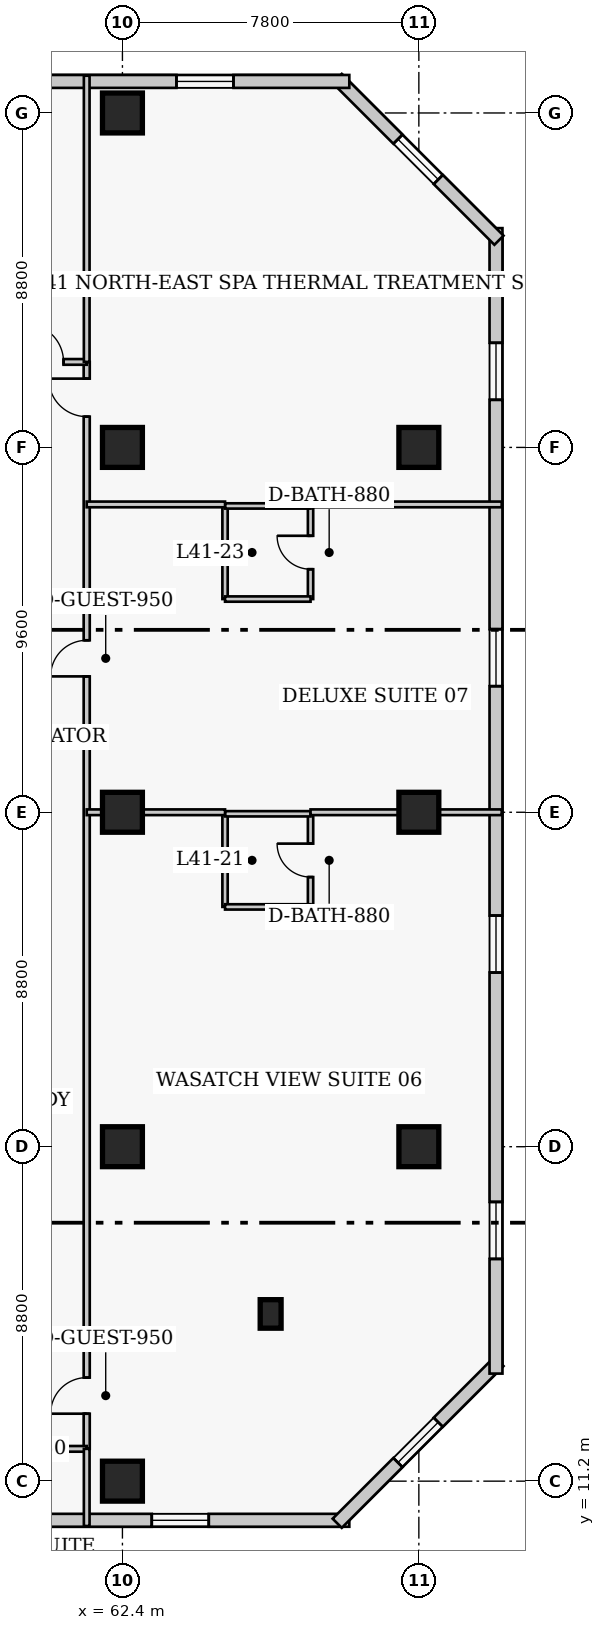
"""IFC4 building model, lengths in metres.
Left out: names, types, materials, properties, quantities, classifications, styles, units other than length and angle.
Written with IfcOpenShell. Run it as: python <this file> out.ifc"""

import sys

from ifc_helpers import new_model, si_unit, direction, frame, frame_2d, origin, origin_2d, place, context, subcontext, project, spatial, rectangle, extrude, element, fill, save


model = new_model("IFC4")
c1 = context("Model", 3, precision=1e-05, world=origin(), true_north=direction((0.0, 1.0)))
c2 = subcontext(c1, "Body", "Model", "MODEL_VIEW")
j1 = project(units=[si_unit("LENGTHUNIT", "METRE"), si_unit("PLANEANGLEUNIT", "RADIAN")], contexts=[c1])
p1 = place(None, origin())
s1 = spatial("IfcSite", under=j1, at=p1, CompositionType="ELEMENT")
p2 = place(p1, origin())
s2 = spatial("IfcBuilding", under=s1, at=p2, CompositionType="ELEMENT")
p3 = place(p2, frame((0.0, 0.0, 165.0)))
s3 = spatial("IfcBuildingStorey", under=s2, at=p3, CompositionType="ELEMENT", Elevation=165.0)
for number, where, z_axis, x_axis in (
    (1, (62.4, 11.2, 0.0), (0.0, 0.0, 1.0), (1.0, 0.0, 0.0)),
    (2, (62.4, 20.0, 0.0), (0.0, 0.0, 1.0), (1.0, 0.0, 0.0)),
    (3, (62.4, 28.8, 0.0), (0.0, 0.0, 1.0), (1.0, 0.0, 0.0)),
    (4, (62.4, 38.4, 0.0), (0.0, 0.0, 1.0), (1.0, 0.0, 0.0)),
    (5, (62.4, 47.2, 0.0), (0.0, 0.0, 1.0), (1.0, 0.0, 0.0)),
    (6, (70.2, 20.0, 0.0), (0.0, 0.0, 1.0), (1.0, 0.0, 0.0)),
    (7, (70.2, 28.8, 0.0), (0.0, 0.0, 1.0), (1.0, 0.0, 0.0)),
    (8, (70.2, 38.4, 0.0), (0.0, 0.0, 1.0), (1.0, 0.0, 0.0)),
):
    element("IfcColumn", number, at=place(p3, frame(where, z_axis=z_axis, x_axis=x_axis)), inside=s3, PredefinedType="COLUMN", context=c2, shape_type="SweptSolid", body=[
        extrude(rectangle(XDim=1.05, YDim=1.05, at=origin_2d()), origin(), (0.0, 0.0, 1.0), 3.8),
    ])
p4 = place(p3, frame((66.3, 15.6, 0.0), z_axis=(0.0, 0.0, 1.0), x_axis=(1.0, 0.0, 0.0)))
e9 = element("IfcColumn", 9, at=p4, inside=s3, PredefinedType="PILASTER", context=c2, shape_type="SweptSolid", body=[
    extrude(rectangle(XDim=0.55, YDim=0.75, at=origin_2d()), origin(), (0.0, 0.0, 1.0), 3.8),
])
p5 = place(p3, frame((41.68, 10.17, 0.0), z_axis=(0.0, 0.0, 1.0), x_axis=(1.0, 0.0, 0.0)))
e10 = element("IfcWall", 10, at=p5, inside=s3, PredefinedType="SOLIDWALL", context=c2, shape_type="SweptSolid", body=[
    extrude(rectangle(XDim=26.69, YDim=0.34, at=frame_2d((13.345, 0.0))), origin(), (0.0, 0.0, 1.0), 3.55),
])
p6 = place(p5, frame((2.548, 0.0, 0.85)))
e11 = element("IfcOpeningElement", 11, at=p6, cuts=e10, PredefinedType="OPENING", context=c2, shape_type="SweptSolid", body=[
    extrude(rectangle(XDim=1.5, YDim=1.75, at=frame_2d((0.75, 0.875))), frame((0.0, 0.18, 0.0), z_axis=(0.0, -1.0, 0.0), x_axis=(1.0, 0.0, 0.0)), (0.0, 0.0, 1.0), 0.36),
])
p7 = place(p5, frame((13.745, 0.0, 0.85)))
e12 = element("IfcOpeningElement", 12, at=p7, cuts=e10, PredefinedType="OPENING", context=c2, shape_type="SweptSolid", body=[
    extrude(rectangle(XDim=1.5, YDim=1.75, at=frame_2d((0.75, 0.875))), frame((0.0, 0.18, 0.0), z_axis=(0.0, -1.0, 0.0), x_axis=(1.0, 0.0, 0.0)), (0.0, 0.0, 1.0), 0.36),
])
p8 = place(p5, frame((21.492, 0.0, 0.85)))
e13 = element("IfcOpeningElement", 13, at=p8, cuts=e10, PredefinedType="OPENING", context=c2, shape_type="SweptSolid", body=[
    extrude(rectangle(XDim=1.5, YDim=1.75, at=frame_2d((0.75, 0.875))), frame((0.0, 0.18, 0.0), z_axis=(0.0, -1.0, 0.0), x_axis=(1.0, 0.0, 0.0)), (0.0, 0.0, 1.0), 0.36),
])
p9 = place(p3, frame((68.052, 10.092, 0.0), z_axis=(0.0, 0.0, 1.0), x_axis=(0.707106781187, 0.707106781187, 0.0)))
e14 = element("IfcWall", 14, at=p9, inside=s3, PredefinedType="SOLIDWALL", context=c2, shape_type="SweptSolid", body=[
    extrude(rectangle(XDim=6.02, YDim=0.34, at=frame_2d((3.01, 0.0))), origin(), (0.0, 0.0, 1.0), 3.55),
])
p10 = place(p9, frame((2.26, 0.0, 0.85)))
e15 = element("IfcOpeningElement", 15, at=p10, cuts=e14, PredefinedType="OPENING", context=c2, shape_type="SweptSolid", body=[
    extrude(rectangle(XDim=1.5, YDim=1.75, at=frame_2d((0.75, 0.875))), frame((0.0, 0.18, 0.0), z_axis=(0.0, -1.0, 0.0), x_axis=(1.0, 0.0, 0.0)), (0.0, 0.0, 1.0), 0.36),
])
p11 = place(p3, frame((72.23, 14.03, 0.0), z_axis=(0.0, 0.0, 1.0), x_axis=(0.0, 1.0, 0.0)))
e16 = element("IfcWall", 16, at=p11, inside=s3, PredefinedType="SOLIDWALL", context=c2, shape_type="SweptSolid", body=[
    extrude(rectangle(XDim=30.14, YDim=0.34, at=frame_2d((15.07, 0.0))), origin(), (0.0, 0.0, 1.0), 3.55),
])
p12 = place(p11, frame((3.018, 0.0, 0.85)))
e17 = element("IfcOpeningElement", 17, at=p12, cuts=e16, PredefinedType="OPENING", context=c2, shape_type="SweptSolid", body=[
    extrude(rectangle(XDim=1.5, YDim=1.75, at=frame_2d((0.75, 0.875))), frame((0.0, 0.18, 0.0), z_axis=(0.0, -1.0, 0.0), x_axis=(1.0, 0.0, 0.0)), (0.0, 0.0, 1.0), 0.36),
])
p13 = place(p11, frame((10.552, 0.0, 0.85)))
e18 = element("IfcOpeningElement", 18, at=p13, cuts=e16, PredefinedType="OPENING", context=c2, shape_type="SweptSolid", body=[
    extrude(rectangle(XDim=1.5, YDim=1.75, at=frame_2d((0.75, 0.875))), frame((0.0, 0.18, 0.0), z_axis=(0.0, -1.0, 0.0), x_axis=(1.0, 0.0, 0.0)), (0.0, 0.0, 1.0), 0.36),
])
p14 = place(p11, frame((18.087, 0.0, 0.85)))
e19 = element("IfcOpeningElement", 19, at=p14, cuts=e16, PredefinedType="OPENING", context=c2, shape_type="SweptSolid", body=[
    extrude(rectangle(XDim=1.5, YDim=1.75, at=frame_2d((0.75, 0.875))), frame((0.0, 0.18, 0.0), z_axis=(0.0, -1.0, 0.0), x_axis=(1.0, 0.0, 0.0)), (0.0, 0.0, 1.0), 0.36),
])
p15 = place(p11, frame((25.623, 0.0, 0.85)))
e20 = element("IfcOpeningElement", 20, at=p15, cuts=e16, PredefinedType="OPENING", context=c2, shape_type="SweptSolid", body=[
    extrude(rectangle(XDim=1.5, YDim=1.75, at=frame_2d((0.75, 0.875))), frame((0.0, 0.18, 0.0), z_axis=(0.0, -1.0, 0.0), x_axis=(1.0, 0.0, 0.0)), (0.0, 0.0, 1.0), 0.36),
])
p16 = place(p3, frame((72.308, 43.852, 0.0), z_axis=(0.0, 0.0, 1.0), x_axis=(-0.707106781187, 0.707106781187, 0.0)))
e21 = element("IfcWall", 21, at=p16, inside=s3, PredefinedType="SOLIDWALL", context=c2, shape_type="SweptSolid", body=[
    extrude(rectangle(XDim=6.02, YDim=0.34, at=frame_2d((3.01, 0.0))), origin(), (0.0, 0.0, 1.0), 3.55),
])
p17 = place(p16, frame((2.26, 0.0, 0.85)))
e22 = element("IfcOpeningElement", 22, at=p17, cuts=e21, PredefinedType="OPENING", context=c2, shape_type="SweptSolid", body=[
    extrude(rectangle(XDim=1.5, YDim=1.75, at=frame_2d((0.75, 0.875))), frame((0.0, 0.18, 0.0), z_axis=(0.0, -1.0, 0.0), x_axis=(1.0, 0.0, 0.0)), (0.0, 0.0, 1.0), 0.36),
])
p18 = place(p3, frame((68.37, 48.03, 0.0), z_axis=(0.0, 0.0, 1.0), x_axis=(-1.0, 0.0, 0.0)))
e23 = element("IfcWall", 23, at=p18, inside=s3, PredefinedType="SOLIDWALL", context=c2, shape_type="SweptSolid", body=[
    extrude(rectangle(XDim=26.69, YDim=0.34, at=frame_2d((13.345, 0.0))), origin(), (0.0, 0.0, 1.0), 3.55),
])
p19 = place(p18, frame((3.048, 0.0, 0.85)))
e24 = element("IfcOpeningElement", 24, at=p19, cuts=e23, PredefinedType="OPENING", context=c2, shape_type="SweptSolid", body=[
    extrude(rectangle(XDim=1.5, YDim=1.75, at=frame_2d((0.75, 0.875))), frame((0.0, 0.18, 0.0), z_axis=(0.0, -1.0, 0.0), x_axis=(1.0, 0.0, 0.0)), (0.0, 0.0, 1.0), 0.36),
])
p20 = place(p18, frame((11.445, 0.0, 0.85)))
e25 = element("IfcOpeningElement", 25, at=p20, cuts=e23, PredefinedType="OPENING", context=c2, shape_type="SweptSolid", body=[
    extrude(rectangle(XDim=1.5, YDim=1.75, at=frame_2d((0.75, 0.875))), frame((0.0, 0.18, 0.0), z_axis=(0.0, -1.0, 0.0), x_axis=(1.0, 0.0, 0.0)), (0.0, 0.0, 1.0), 0.36),
])
p21 = place(p18, frame((22.642, 0.0, 0.85)))
e26 = element("IfcOpeningElement", 26, at=p21, cuts=e23, PredefinedType="OPENING", context=c2, shape_type="SweptSolid", body=[
    extrude(rectangle(XDim=1.5, YDim=1.75, at=frame_2d((0.75, 0.875))), frame((0.0, 0.18, 0.0), z_axis=(0.0, -1.0, 0.0), x_axis=(1.0, 0.0, 0.0)), (0.0, 0.0, 1.0), 0.36),
])
p22 = place(p3, frame((61.46, 12.05, 0.0), z_axis=(0.0, 0.0, 1.0), x_axis=(0.0, 1.0, 0.0)))
e27 = element("IfcWall", 27, at=p22, inside=s3, PredefinedType="PARTITIONING", context=c2, shape_type="SweptSolid", body=[
    extrude(rectangle(XDim=28.6, YDim=0.16, at=frame_2d((14.3, 0.0))), origin(), (0.0, 0.0, 1.0), 3.55),
])
p23 = place(p22, frame((0.925, 0.0, 0.0)))
e28 = element("IfcOpeningElement", 28, at=p23, cuts=e27, PredefinedType="OPENING", context=c2, shape_type="SweptSolid", body=[
    extrude(rectangle(XDim=0.95, YDim=2.1, at=frame_2d((0.475, 1.05))), frame((0.0, 0.09, 0.0), z_axis=(0.0, -1.0, 0.0), x_axis=(1.0, 0.0, 0.0)), (0.0, 0.0, 1.0), 0.18),
])
p24 = place(p22, frame((20.325, 0.0, 0.0)))
e29 = element("IfcOpeningElement", 29, at=p24, cuts=e27, PredefinedType="OPENING", context=c2, shape_type="SweptSolid", body=[
    extrude(rectangle(XDim=0.95, YDim=2.1, at=frame_2d((0.475, 1.05))), frame((0.0, 0.09, 0.0), z_axis=(0.0, -1.0, 0.0), x_axis=(1.0, 0.0, 0.0)), (0.0, 0.0, 1.0), 0.18),
])
p25 = place(p22, frame((27.16, 0.0, 0.0)))
e30 = element("IfcOpeningElement", 30, at=p25, cuts=e27, PredefinedType="OPENING", context=c2, shape_type="SweptSolid", body=[
    extrude(rectangle(XDim=1.0, YDim=2.15, at=frame_2d((0.5, 1.075))), frame((0.0, 0.09, 0.0), z_axis=(0.0, -1.0, 0.0), x_axis=(1.0, 0.0, 0.0)), (0.0, 0.0, 1.0), 0.18),
])
p26 = place(p3, frame((59.24, 12.05, 0.0), z_axis=(0.0, 0.0, 1.0), x_axis=(1.0, 0.0, 0.0)))
e31 = element("IfcWall", 31, at=p26, inside=s3, PredefinedType="PARTITIONING", context=c2, shape_type="SweptSolid", body=[
    extrude(rectangle(XDim=2.22, YDim=0.15, at=frame_2d((1.11, 0.0))), origin(), (0.0, 0.0, 1.0), 3.55),
])
p27 = place(p3, frame((56.8, 40.65, 0.0), z_axis=(0.0, 0.0, 1.0), x_axis=(1.0, 0.0, 0.0)))
e32 = element("IfcWall", 32, at=p27, inside=s3, PredefinedType="PARTITIONING", context=c2, shape_type="SweptSolid", body=[
    extrude(rectangle(XDim=4.66, YDim=0.15, at=frame_2d((2.33, 0.0))), origin(), (0.0, 0.0, 1.0), 3.55),
])
p28 = place(p27, frame((3.05, 0.0, 0.0)))
e33 = element("IfcOpeningElement", 33, at=p28, cuts=e32, PredefinedType="OPENING", context=c2, shape_type="SweptSolid", body=[
    extrude(rectangle(XDim=1.0, YDim=2.15, at=frame_2d((0.5, 1.075))), frame((0.0, 0.085, 0.0), z_axis=(0.0, -1.0, 0.0), x_axis=(1.0, 0.0, 0.0)), (0.0, 0.0, 1.0), 0.17),
])
p29 = place(p3, frame((61.46, 40.65, 0.0), z_axis=(0.0, 0.0, 1.0), x_axis=(0.0, 1.0, 0.0)))
e34 = element("IfcWall", 34, at=p29, inside=s3, PredefinedType="PARTITIONING", context=c2, shape_type="SweptSolid", body=[
    extrude(rectangle(XDim=7.53, YDim=0.15, at=frame_2d((3.765, 0.0))), origin(), (0.0, 0.0, 1.0), 3.55),
])
p30 = place(p3, frame((61.46, 10.02, 0.0), z_axis=(0.0, 0.0, 1.0), x_axis=(0.0, 1.0, 0.0)))
e35 = element("IfcWall", 35, at=p30, inside=s3, PredefinedType="PARTITIONING", context=c2, shape_type="SweptSolid", body=[
    extrude(rectangle(XDim=2.03, YDim=0.15, at=frame_2d((1.015, 0.0))), origin(), (0.0, 0.0, 1.0), 3.55),
])
p31 = place(p3, frame((65.1, 26.31, 0.0), z_axis=(0.0, 0.0, 1.0), x_axis=(0.0, 1.0, 0.0)))
e36 = element("IfcWall", 36, at=p31, inside=s3, PredefinedType="PLUMBINGWALL", context=c2, shape_type="SweptSolid", body=[
    extrude(rectangle(XDim=2.45, YDim=0.14, at=frame_2d((1.225, 0.0))), origin(), (0.0, 0.0, 1.0), 3.55),
])
p32 = place(p3, frame((67.35, 26.31, 0.0), z_axis=(0.0, 0.0, 1.0), x_axis=(0.0, 1.0, 0.0)))
e37 = element("IfcWall", 37, at=p32, inside=s3, PredefinedType="PLUMBINGWALL", context=c2, shape_type="SweptSolid", body=[
    extrude(rectangle(XDim=2.45, YDim=0.14, at=frame_2d((1.225, 0.0))), origin(), (0.0, 0.0, 1.0), 3.55),
])
p33 = place(p32, frame((0.785, 0.0, 0.0)))
e38 = element("IfcOpeningElement", 38, at=p33, cuts=e37, PredefinedType="OPENING", context=c2, shape_type="SweptSolid", body=[
    extrude(rectangle(XDim=0.88, YDim=2.05, at=frame_2d((0.44, 1.025))), frame((0.0, 0.08, 0.0), z_axis=(0.0, -1.0, 0.0), x_axis=(1.0, 0.0, 0.0)), (0.0, 0.0, 1.0), 0.16),
])
p34 = place(p3, frame((65.1, 26.31, 0.0), z_axis=(0.0, 0.0, 1.0), x_axis=(1.0, 0.0, 0.0)))
e39 = element("IfcWall", 39, at=p34, inside=s3, PredefinedType="PLUMBINGWALL", context=c2, shape_type="SweptSolid", body=[
    extrude(rectangle(XDim=2.25, YDim=0.14, at=frame_2d((1.125, 0.0))), origin(), (0.0, 0.0, 1.0), 3.55),
])
p35 = place(p3, frame((65.1, 28.76, 0.0), z_axis=(0.0, 0.0, 1.0), x_axis=(1.0, 0.0, 0.0)))
e40 = element("IfcWall", 40, at=p35, inside=s3, PredefinedType="PLUMBINGWALL", context=c2, shape_type="SweptSolid", body=[
    extrude(rectangle(XDim=2.25, YDim=0.14, at=frame_2d((1.125, 0.0))), origin(), (0.0, 0.0, 1.0), 2.9),
])
p36 = place(p3, frame((61.46, 28.8, 0.0), z_axis=(0.0, 0.0, 1.0), x_axis=(1.0, 0.0, 0.0)))
e41 = element("IfcWall", 41, at=p36, inside=s3, PredefinedType="PARTITIONING", context=c2, shape_type="SweptSolid", body=[
    extrude(rectangle(XDim=3.64, YDim=0.15, at=frame_2d((1.82, 0.0))), origin(), (0.0, 0.0, 1.0), 2.778),
])
p37 = place(p3, frame((67.35, 28.8, 0.0), z_axis=(0.0, 0.0, 1.0), x_axis=(1.0, 0.0, 0.0)))
e42 = element("IfcWall", 42, at=p37, inside=s3, PredefinedType="PARTITIONING", context=c2, shape_type="SweptSolid", body=[
    extrude(rectangle(XDim=5.03, YDim=0.15, at=frame_2d((2.515, 0.0))), origin(), (0.0, 0.0, 1.0), 2.778),
])
p38 = place(p3, frame((65.1, 34.41, 0.0), z_axis=(0.0, 0.0, 1.0), x_axis=(0.0, 1.0, 0.0)))
e43 = element("IfcWall", 43, at=p38, inside=s3, PredefinedType="PLUMBINGWALL", context=c2, shape_type="SweptSolid", body=[
    extrude(rectangle(XDim=2.45, YDim=0.14, at=frame_2d((1.225, 0.0))), origin(), (0.0, 0.0, 1.0), 3.55),
])
p39 = place(p3, frame((67.35, 34.41, 0.0), z_axis=(0.0, 0.0, 1.0), x_axis=(0.0, 1.0, 0.0)))
e44 = element("IfcWall", 44, at=p39, inside=s3, PredefinedType="PLUMBINGWALL", context=c2, shape_type="SweptSolid", body=[
    extrude(rectangle(XDim=2.45, YDim=0.14, at=frame_2d((1.225, 0.0))), origin(), (0.0, 0.0, 1.0), 3.55),
])
p40 = place(p39, frame((0.785, 0.0, 0.0)))
e45 = element("IfcOpeningElement", 45, at=p40, cuts=e44, PredefinedType="OPENING", context=c2, shape_type="SweptSolid", body=[
    extrude(rectangle(XDim=0.88, YDim=2.05, at=frame_2d((0.44, 1.025))), frame((0.0, 0.08, 0.0), z_axis=(0.0, -1.0, 0.0), x_axis=(1.0, 0.0, 0.0)), (0.0, 0.0, 1.0), 0.16),
])
for number, where, z_axis, x_axis in (
    (46, (65.1, 34.41, 0.0), (0.0, 0.0, 1.0), (1.0, 0.0, 0.0)),
    (47, (65.1, 36.86, 0.0), (0.0, 0.0, 1.0), (1.0, 0.0, 0.0)),
):
    element("IfcWall", number, at=place(p3, frame(where, z_axis=z_axis, x_axis=x_axis)), inside=s3, PredefinedType="PLUMBINGWALL", context=c2, shape_type="SweptSolid", body=[
        extrude(rectangle(XDim=2.25, YDim=0.14, at=frame_2d((1.125, 0.0))), origin(), (0.0, 0.0, 1.0), 3.55),
    ])
p41 = place(p3, frame((61.46, 36.9, 0.0), z_axis=(0.0, 0.0, 1.0), x_axis=(1.0, 0.0, 0.0)))
e48 = element("IfcWall", 48, at=p41, inside=s3, PredefinedType="PARTITIONING", context=c2, shape_type="SweptSolid", body=[
    extrude(rectangle(XDim=3.64, YDim=0.15, at=frame_2d((1.82, 0.0))), origin(), (0.0, 0.0, 1.0), 3.55),
])
p42 = place(p3, frame((67.35, 36.9, 0.0), z_axis=(0.0, 0.0, 1.0), x_axis=(1.0, 0.0, 0.0)))
e49 = element("IfcWall", 49, at=p42, inside=s3, PredefinedType="PARTITIONING", context=c2, shape_type="SweptSolid", body=[
    extrude(rectangle(XDim=5.03, YDim=0.15, at=frame_2d((2.515, 0.0))), origin(), (0.0, 0.0, 1.0), 3.55),
])
p43 = place(p8, origin())
e50 = element("IfcWindow", 50, at=p43, inside=s3, PartitioningType="SINGLE_PANEL", PredefinedType="WINDOW", context=c2, shape_type="SweptSolid", body=[
    extrude(rectangle(XDim=1.5, YDim=1.75, at=frame_2d((0.75, 0.875))), frame((0.0, 0.03, 0.0), z_axis=(0.0, -1.0, 0.0), x_axis=(1.0, 0.0, 0.0)), (0.0, 0.0, 1.0), 0.06),
])
fill(e13, e50)
p44 = place(p10, origin())
e51 = element("IfcWindow", 51, at=p44, inside=s3, PartitioningType="SINGLE_PANEL", PredefinedType="WINDOW", context=c2, shape_type="SweptSolid", body=[
    extrude(rectangle(XDim=1.5, YDim=1.75, at=frame_2d((0.75, 0.875))), frame((0.0, 0.03, 0.0), z_axis=(0.0, -1.0, 0.0), x_axis=(1.0, 0.0, 0.0)), (0.0, 0.0, 1.0), 0.06),
])
fill(e15, e51)
p45 = place(p12, origin())
e52 = element("IfcWindow", 52, at=p45, inside=s3, PartitioningType="SINGLE_PANEL", PredefinedType="WINDOW", context=c2, shape_type="SweptSolid", body=[
    extrude(rectangle(XDim=1.5, YDim=1.75, at=frame_2d((0.75, 0.875))), frame((0.0, 0.03, 0.0), z_axis=(0.0, -1.0, 0.0), x_axis=(1.0, 0.0, 0.0)), (0.0, 0.0, 1.0), 0.06),
])
fill(e17, e52)
p46 = place(p13, origin())
e53 = element("IfcWindow", 53, at=p46, inside=s3, PartitioningType="SINGLE_PANEL", PredefinedType="WINDOW", context=c2, shape_type="SweptSolid", body=[
    extrude(rectangle(XDim=1.5, YDim=1.75, at=frame_2d((0.75, 0.875))), frame((0.0, 0.03, 0.0), z_axis=(0.0, -1.0, 0.0), x_axis=(1.0, 0.0, 0.0)), (0.0, 0.0, 1.0), 0.06),
])
fill(e18, e53)
p47 = place(p14, origin())
e54 = element("IfcWindow", 54, at=p47, inside=s3, PartitioningType="SINGLE_PANEL", PredefinedType="WINDOW", context=c2, shape_type="SweptSolid", body=[
    extrude(rectangle(XDim=1.5, YDim=1.75, at=frame_2d((0.75, 0.875))), frame((0.0, 0.03, 0.0), z_axis=(0.0, -1.0, 0.0), x_axis=(1.0, 0.0, 0.0)), (0.0, 0.0, 1.0), 0.06),
])
fill(e19, e54)
p48 = place(p15, origin())
e55 = element("IfcWindow", 55, at=p48, inside=s3, PartitioningType="SINGLE_PANEL", PredefinedType="WINDOW", context=c2, shape_type="SweptSolid", body=[
    extrude(rectangle(XDim=1.5, YDim=1.75, at=frame_2d((0.75, 0.875))), frame((0.0, 0.03, 0.0), z_axis=(0.0, -1.0, 0.0), x_axis=(1.0, 0.0, 0.0)), (0.0, 0.0, 1.0), 0.06),
])
fill(e20, e55)
p49 = place(p17, origin())
e56 = element("IfcWindow", 56, at=p49, inside=s3, PartitioningType="SINGLE_PANEL", PredefinedType="WINDOW", context=c2, shape_type="SweptSolid", body=[
    extrude(rectangle(XDim=1.5, YDim=1.75, at=frame_2d((0.75, 0.875))), frame((0.0, 0.03, 0.0), z_axis=(0.0, -1.0, 0.0), x_axis=(1.0, 0.0, 0.0)), (0.0, 0.0, 1.0), 0.06),
])
fill(e22, e56)
p50 = place(p19, origin())
e57 = element("IfcWindow", 57, at=p50, inside=s3, PartitioningType="SINGLE_PANEL", PredefinedType="WINDOW", context=c2, shape_type="SweptSolid", body=[
    extrude(rectangle(XDim=1.5, YDim=1.75, at=frame_2d((0.75, 0.875))), frame((0.0, 0.03, 0.0), z_axis=(0.0, -1.0, 0.0), x_axis=(1.0, 0.0, 0.0)), (0.0, 0.0, 1.0), 0.06),
])
fill(e24, e57)
p51 = place(p28, origin())
e58 = element("IfcDoor", 58, at=p51, inside=s3, OperationType="SINGLE_SWING_LEFT", PredefinedType="DOOR", context=c2, shape_type="SweptSolid", body=[
    extrude(rectangle(XDim=1.0, YDim=2.15, at=frame_2d((0.5, 1.075))), frame((0.0, 0.025, 0.0), z_axis=(0.0, -1.0, 0.0), x_axis=(1.0, 0.0, 0.0)), (0.0, 0.0, 1.0), 0.05),
])
fill(e33, e58)
p52 = place(p33, origin())
e59 = element("IfcDoor", 59, at=p52, inside=s3, OperationType="SINGLE_SWING_RIGHT", PredefinedType="DOOR", context=c2, shape_type="SweptSolid", body=[
    extrude(rectangle(XDim=0.88, YDim=2.05, at=frame_2d((0.44, 1.025))), frame((0.0, 0.025, 0.0), z_axis=(0.0, -1.0, 0.0), x_axis=(1.0, 0.0, 0.0)), (0.0, 0.0, 1.0), 0.05),
])
fill(e38, e59)
p53 = place(p23, origin())
e60 = element("IfcDoor", 60, at=p53, inside=s3, OperationType="SINGLE_SWING_LEFT", PredefinedType="DOOR", context=c2, shape_type="SweptSolid", body=[
    extrude(rectangle(XDim=0.95, YDim=2.1, at=frame_2d((0.475, 1.05))), frame((0.0, 0.025, 0.0), z_axis=(0.0, -1.0, 0.0), x_axis=(1.0, 0.0, 0.0)), (0.0, 0.0, 1.0), 0.05),
])
fill(e28, e60)
p54 = place(p40, origin())
e61 = element("IfcDoor", 61, at=p54, inside=s3, OperationType="SINGLE_SWING_RIGHT", PredefinedType="DOOR", context=c2, shape_type="SweptSolid", body=[
    extrude(rectangle(XDim=0.88, YDim=2.05, at=frame_2d((0.44, 1.025))), frame((0.0, 0.025, 0.0), z_axis=(0.0, -1.0, 0.0), x_axis=(1.0, 0.0, 0.0)), (0.0, 0.0, 1.0), 0.05),
])
fill(e45, e61)
p55 = place(p24, origin())
e62 = element("IfcDoor", 62, at=p55, inside=s3, OperationType="SINGLE_SWING_LEFT", PredefinedType="DOOR", context=c2, shape_type="SweptSolid", body=[
    extrude(rectangle(XDim=0.95, YDim=2.1, at=frame_2d((0.475, 1.05))), frame((0.0, 0.025, 0.0), z_axis=(0.0, -1.0, 0.0), x_axis=(1.0, 0.0, 0.0)), (0.0, 0.0, 1.0), 0.05),
])
fill(e29, e62)
p56 = place(p25, origin())
e63 = element("IfcDoor", 63, at=p56, inside=s3, OperationType="SINGLE_SWING_RIGHT", PredefinedType="DOOR", context=c2, shape_type="SweptSolid", body=[
    extrude(rectangle(XDim=1.0, YDim=2.15, at=frame_2d((0.5, 1.075))), frame((0.0, 0.025, 0.0), z_axis=(0.0, -1.0, 0.0), x_axis=(1.0, 0.0, 0.0)), (0.0, 0.0, 1.0), 0.05),
])
fill(e30, e63)
save(model, sys.argv[1])
